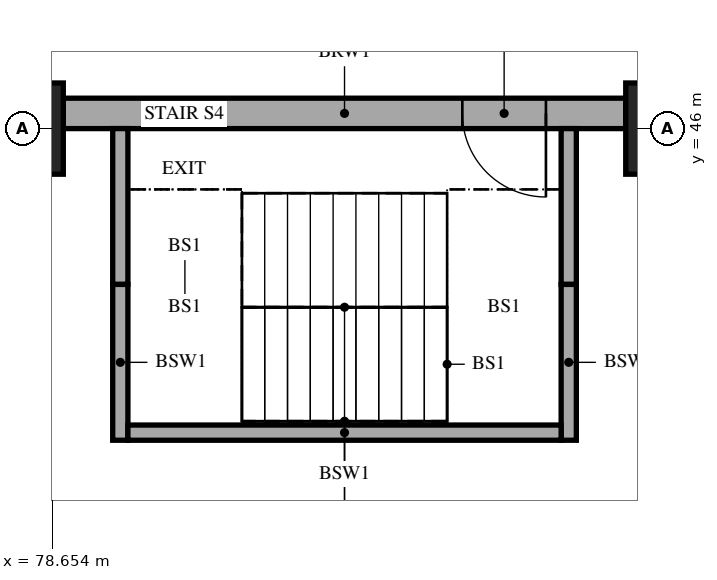
"""IFC4 building model, lengths in metres.
Left out: names, types, materials, properties, quantities, classifications, styles, units other than length and angle.
Written with IfcOpenShell. Run it as: python <this file> out.ifc"""

import sys

from ifc_helpers import new_model, si_unit, direction, frame, frame_2d, origin, origin_2d, place, context, subcontext, project, spatial, rectangle, extrude, element, fill, save


model = new_model("IFC4")
c1 = context("Model", 3, precision=1e-05, world=origin(), true_north=direction((0.0, 1.0)))
c2 = subcontext(c1, "Body", "Model", "MODEL_VIEW")
j1 = project(units=[si_unit("LENGTHUNIT", "METRE"), si_unit("PLANEANGLEUNIT", "RADIAN")], contexts=[c1])
p1 = place(None, origin())
s1 = spatial("IfcSite", under=j1, at=p1, CompositionType="ELEMENT")
p2 = place(p1, origin())
s2 = spatial("IfcBuilding", under=s1, at=p2, CompositionType="ELEMENT")
p3 = place(p2, frame((0.0, 0.0, -4.2)))
s3 = spatial("IfcBuildingStorey", under=s2, at=p3, CompositionType="ELEMENT", Elevation=-4.2)
for number, where, z_axis, x_axis in (
    (1, (78.0, 46.0, 0.0), (0.0, 0.0, 1.0), (1.0, 0.0, 0.0)),
    (2, (87.0, 46.0, 0.0), (0.0, 0.0, 1.0), (1.0, 0.0, 0.0)),
):
    element("IfcColumn", number, at=place(p3, frame(where, z_axis=z_axis, x_axis=x_axis)), inside=s3, PredefinedType="COLUMN", context=c2, shape_type="SweptSolid", body=[
        extrude(rectangle(XDim=1.6, YDim=1.2, at=origin_2d()), origin(), (0.0, 0.0, 1.0), 4.2),
    ])
p4 = place(p3, frame((78.8, 46.2, 0.0), z_axis=(0.0, 0.0, 1.0), x_axis=(1.0, 0.0, 0.0)))
e3 = element("IfcWall", 3, at=p4, inside=s3, PredefinedType="SOLIDWALL", context=c2, shape_type="SweptSolid", body=[
    extrude(rectangle(XDim=7.4, YDim=0.4, at=frame_2d((3.7, 0.0))), origin(), (0.0, 0.0, 1.0), 4.2),
])
p5 = place(p4, frame((5.25, 0.0, 0.0)))
e4 = element("IfcOpeningElement", 4, at=p5, cuts=e3, PredefinedType="OPENING", context=c2, shape_type="SweptSolid", body=[
    extrude(rectangle(XDim=1.1, YDim=2.1, at=frame_2d((0.55, 1.05))), frame((0.0, 0.21, 0.0), z_axis=(0.0, -1.0, 0.0), x_axis=(1.0, 0.0, 0.0)), (0.0, 0.0, 1.0), 0.42),
])
for number, where, z_axis, x_axis in (
    (5, (79.55, 46.0, 0.0), (0.0, 0.0, 1.0), (0.0, -1.0, 0.0)),
    (6, (79.55, 43.95, 0.0), (0.0, 0.0, 1.0), (0.0, -1.0, 0.0)),
    (7, (85.45, 46.0, 0.0), (0.0, 0.0, 1.0), (0.0, -1.0, 0.0)),
    (8, (85.45, 43.95, 0.0), (0.0, 0.0, 1.0), (0.0, -1.0, 0.0)),
):
    element("IfcWall", number, at=place(p3, frame(where, z_axis=z_axis, x_axis=x_axis)), inside=s3, PredefinedType="SOLIDWALL", context=c2, shape_type="SweptSolid", body=[
        extrude(rectangle(XDim=2.05, YDim=0.2, at=frame_2d((1.025, 0.0))), origin(), (0.0, 0.0, 1.0), 4.2),
    ])
p6 = place(p3, frame((79.65, 42.0, 0.0), z_axis=(0.0, 0.0, 1.0), x_axis=(1.0, 0.0, 0.0)))
e9 = element("IfcWall", 9, at=p6, inside=s3, PredefinedType="SOLIDWALL", context=c2, shape_type="SweptSolid", body=[
    extrude(rectangle(XDim=5.7, YDim=0.2, at=frame_2d((2.85, 0.0))), origin(), (0.0, 0.0, 1.0), 4.2),
])
p7 = place(p5, frame((1.1, 0.0, 0.0), z_axis=(0.0, 0.0, 1.0), x_axis=(-1.0, 0.0, 0.0)))
e10 = element("IfcDoor", 10, at=p7, inside=s3, OperationType="SINGLE_SWING_LEFT", PredefinedType="DOOR", context=c2, shape_type="SweptSolid", body=[
    extrude(rectangle(XDim=1.1, YDim=2.1, at=frame_2d((0.55, 1.05))), frame((0.0, 0.025, 0.0), z_axis=(0.0, -1.0, 0.0), x_axis=(1.0, 0.0, 0.0)), (0.0, 0.0, 1.0), 0.05),
])
fill(e4, e10)
save(model, sys.argv[1])
